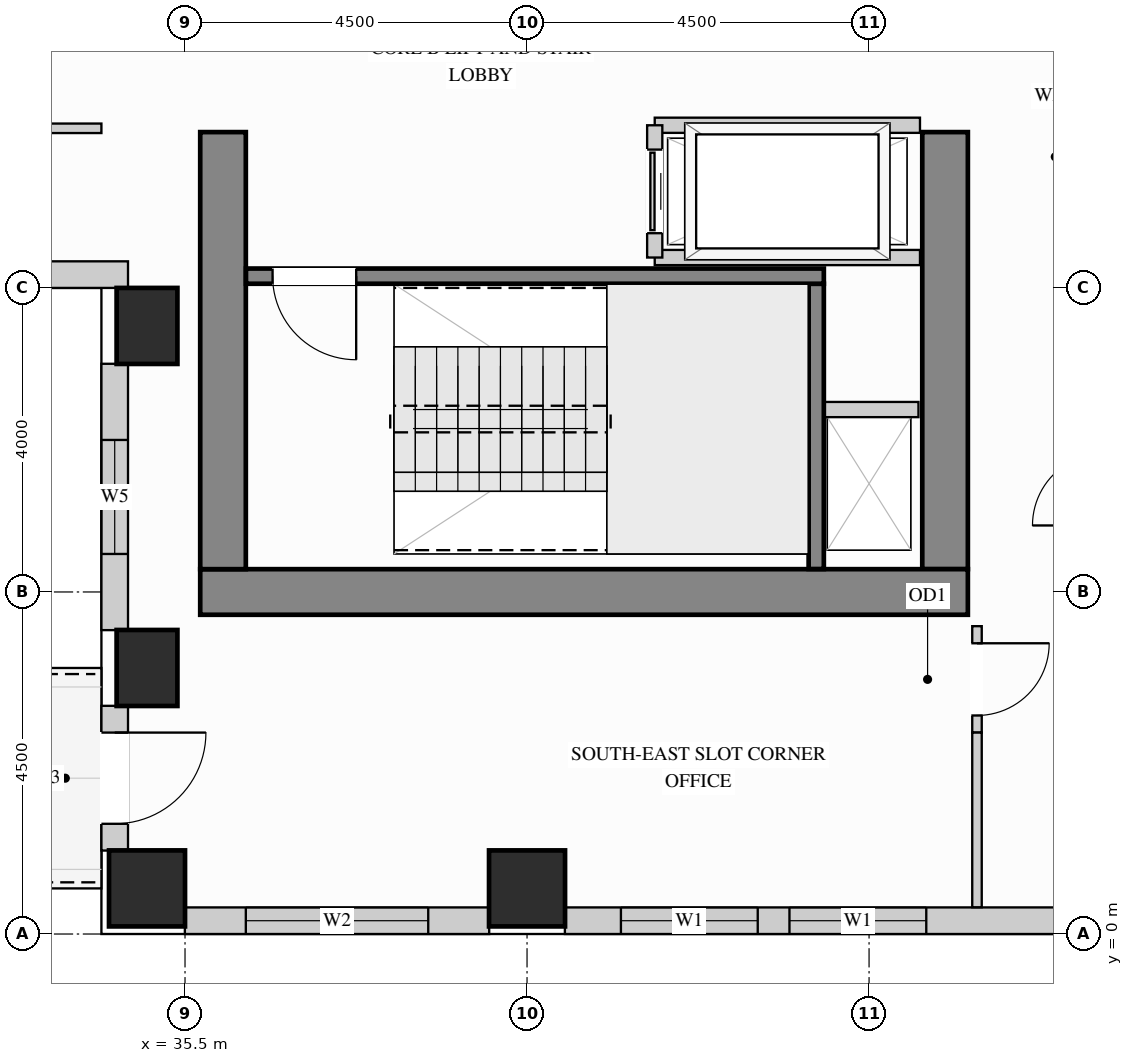
"""IFC4 building model, lengths in metres.
Left out: names, types, materials, properties, quantities, classifications, styles, units other than length and angle.
Written with IfcOpenShell. Run it as: python <this file> out.ifc"""

import sys

from ifc_helpers import new_model, si_unit, direction, frame, frame_2d, origin, origin_2d, place, context, subcontext, project, spatial, rectangle, extrude, source, transform, mapped, element, fill, save


model = new_model("IFC4")
c1 = context("Model", 3, precision=1e-05, world=origin(), true_north=direction((0.0, 1.0)))
c2 = subcontext(c1, "Body", "Model", "MODEL_VIEW")
j1 = project(units=[si_unit("LENGTHUNIT", "METRE"), si_unit("PLANEANGLEUNIT", "RADIAN")], contexts=[c1])
p1 = place(None, origin())
s1 = spatial("IfcSite", under=j1, at=p1, CompositionType="ELEMENT")
p2 = place(p1, origin())
s2 = spatial("IfcBuilding", under=s1, at=p2, CompositionType="ELEMENT")
p3 = place(p2, frame((0.0, 0.0, 164.7)))
s3 = spatial("IfcBuildingStorey", under=s2, at=p3, CompositionType="ELEMENT", Elevation=164.7)
m1 = source(origin(), c2, "Body", "SweptSolid", [
    extrude(rectangle(XDim=0.8, YDim=1.0, at=origin_2d()), origin(), (0.0, 0.0, 1.0), 3.4),
])
for number, where, z_axis, x_axis in (
    (1, (35.0, 3.5, 0.0), (0.0, 0.0, 1.0), (1.0, 0.0, 0.0)),
    (2, (35.0, 8.0, 0.0), (0.0, 0.0, 1.0), (1.0, 0.0, 0.0)),
):
    element("IfcColumn", number, at=place(p3, frame(where, z_axis=z_axis, x_axis=x_axis)), inside=s3, PredefinedType="COLUMN", context=c2, shape_type="MappedRepresentation", body=[
        mapped(m1, transform((0.0, 0.0, 0.0), x_axis=(1.0, 0.0, 0.0), y_axis=(0.0, 1.0, 0.0), z_axis=(0.0, 0.0, 1.0))),
    ])
m2 = source(origin(), c2, "Body", "SweptSolid", [
    extrude(rectangle(XDim=1.0, YDim=1.0, at=origin_2d()), origin(), (0.0, 0.0, 1.0), 3.4),
])
for number, where, z_axis, x_axis in (
    (3, (35.0, 0.6, 0.0), (0.0, 0.0, 1.0), (1.0, 0.0, 0.0)),
    (4, (40.0, 0.6, 0.0), (0.0, 0.0, 1.0), (1.0, 0.0, 0.0)),
):
    element("IfcColumn", number, at=place(p3, frame(where, z_axis=z_axis, x_axis=x_axis)), inside=s3, PredefinedType="COLUMN", context=c2, shape_type="MappedRepresentation", body=[
        mapped(m2, transform((0.0, 0.0, 0.0), x_axis=(1.0, 0.0, 0.0), y_axis=(0.0, 1.0, 0.0), z_axis=(0.0, 0.0, 1.0))),
    ])
m3 = source(origin(), c2, "Body", "SweptSolid", [
    extrude(rectangle(XDim=5.75, YDim=0.6, at=frame_2d((2.875, 0.0))), origin(), (0.0, 0.0, 1.0), 3.4),
])
p4 = place(p3, frame((45.5, 4.8, 0.0), z_axis=(0.0, 0.0, 1.0), x_axis=(0.0, 1.0, 0.0)))
e5 = element("IfcWall", 5, at=p4, inside=s3, PredefinedType="SHEAR", context=c2, shape_type="MappedRepresentation", body=[
    mapped(m3, transform((0.0, 0.0, 0.0), x_axis=(1.0, 0.0, 0.0), y_axis=(0.0, 1.0, 0.0), z_axis=(0.0, 0.0, 1.0))),
])
m4 = source(origin(), c2, "Body", "SweptSolid", [
    extrude(rectangle(XDim=10.1, YDim=0.6, at=frame_2d((5.05, 0.0))), origin(), (0.0, 0.0, 1.0), 3.4),
])
p5 = place(p3, frame((35.7, 4.5, 0.0), z_axis=(0.0, 0.0, 1.0), x_axis=(1.0, 0.0, 0.0)))
e6 = element("IfcWall", 6, at=p5, inside=s3, PredefinedType="SHEAR", context=c2, shape_type="MappedRepresentation", body=[
    mapped(m4, transform((0.0, 0.0, 0.0), x_axis=(1.0, 0.0, 0.0), y_axis=(0.0, 1.0, 0.0), z_axis=(0.0, 0.0, 1.0))),
])
p6 = place(p3, frame((36.0, 4.8, 0.0), z_axis=(0.0, 0.0, 1.0), x_axis=(0.0, 1.0, 0.0)))
e7 = element("IfcWall", 7, at=p6, inside=s3, PredefinedType="SHEAR", context=c2, shape_type="MappedRepresentation", body=[
    mapped(m3, transform((0.0, 0.0, 0.0), x_axis=(1.0, 0.0, 0.0), y_axis=(0.0, 1.0, 0.0), z_axis=(0.0, 0.0, 1.0))),
])
p7 = place(p3, frame((30.898, 8.675, 0.0), z_axis=(0.0, 0.0, 1.0), x_axis=(1.0, 0.0, 0.0)))
e8 = element("IfcWall", 8, at=p7, inside=s3, PredefinedType="SOLIDWALL", context=c2, shape_type="SweptSolid", body=[
    extrude(rectangle(XDim=3.852, YDim=0.35, at=frame_2d((1.926, 0.0))), origin(), (0.0, 0.0, 1.0), 3.385),
])
p8 = place(p7, frame((1.176, 0.0, 0.78)))
e9 = element("IfcOpeningElement", 9, at=p8, cuts=e8, PredefinedType="OPENING", context=c2, shape_type="SweptSolid", body=[
    extrude(rectangle(XDim=1.5, YDim=2.0, at=frame_2d((0.75, 1.0))), frame((0.0, 0.185, 0.0), z_axis=(0.0, -1.0, 0.0), x_axis=(1.0, 0.0, 0.0)), (0.0, 0.0, 1.0), 0.37),
])
p9 = place(p3, frame((34.575, 7.502, 0.0), z_axis=(0.0, 0.0, 1.0), x_axis=(0.0, -1.0, 0.0)))
e10 = element("IfcWall", 10, at=p9, inside=s3, PredefinedType="SOLIDWALL", context=c2, shape_type="SweptSolid", body=[
    extrude(rectangle(XDim=3.504, YDim=0.35, at=frame_2d((1.752, 0.0))), origin(), (0.0, 0.0, 1.0), 2.612),
])
p10 = place(p9, frame((1.002, 0.0, 0.78)))
e11 = element("IfcOpeningElement", 11, at=p10, cuts=e10, PredefinedType="OPENING", context=c2, shape_type="SweptSolid", body=[
    extrude(rectangle(XDim=1.5, YDim=1.652, at=frame_2d((0.75, 0.826))), frame((0.0, 0.185, 0.0), z_axis=(0.0, -1.0, 0.0), x_axis=(1.0, 0.0, 0.0)), (0.0, 0.0, 1.0), 0.37),
])
p11 = place(p3, frame((34.575, 3.002, 0.0), z_axis=(0.0, 0.0, 1.0), x_axis=(0.0, -1.0, 0.0)))
e12 = element("IfcWall", 12, at=p11, inside=s3, PredefinedType="SOLIDWALL", context=c2, shape_type="SweptSolid", body=[
    extrude(rectangle(XDim=1.904, YDim=0.35, at=frame_2d((0.952, 0.0))), origin(), (0.0, 0.0, 1.0), 2.612),
])
p12 = place(p11, frame((0.352, 0.0, 0.0)))
e13 = element("IfcOpeningElement", 13, at=p12, cuts=e12, PredefinedType="OPENING", context=c2, shape_type="SweptSolid", body=[
    extrude(rectangle(XDim=1.2, YDim=2.15, at=frame_2d((0.6, 1.075))), frame((0.0, 0.185, 0.0), z_axis=(0.0, -1.0, 0.0), x_axis=(1.0, 0.0, 0.0)), (0.0, 0.0, 1.0), 0.37),
])
p13 = place(p3, frame((35.498, 0.175, 0.0), z_axis=(0.0, 0.0, 1.0), x_axis=(1.0, 0.0, 0.0)))
e14 = element("IfcWall", 14, at=p13, inside=s3, PredefinedType="SOLIDWALL", context=c2, shape_type="SweptSolid", body=[
    extrude(rectangle(XDim=4.004, YDim=0.35, at=frame_2d((2.002, 0.0))), origin(), (0.0, 0.0, 1.0), 2.612),
])
p14 = place(p13, frame((0.802, 0.0, 0.78)))
e15 = element("IfcOpeningElement", 15, at=p14, cuts=e14, PredefinedType="OPENING", context=c2, shape_type="SweptSolid", body=[
    extrude(rectangle(XDim=2.4, YDim=1.652, at=frame_2d((1.2, 0.826))), frame((0.0, 0.185, 0.0), z_axis=(0.0, -1.0, 0.0), x_axis=(1.0, 0.0, 0.0)), (0.0, 0.0, 1.0), 0.37),
])
p15 = place(p3, frame((40.498, 0.175, 0.0), z_axis=(0.0, 0.0, 1.0), x_axis=(1.0, 0.0, 0.0)))
e16 = element("IfcWall", 16, at=p15, inside=s3, PredefinedType="SOLIDWALL", context=c2, shape_type="SweptSolid", body=[
    extrude(rectangle(XDim=6.604, YDim=0.35, at=frame_2d((3.302, 0.0))), origin(), (0.0, 0.0, 1.0), 2.612),
])
p16 = place(p15, frame((0.737, 0.0, 0.78)))
e17 = element("IfcOpeningElement", 17, at=p16, cuts=e16, PredefinedType="OPENING", context=c2, shape_type="SweptSolid", body=[
    extrude(rectangle(XDim=1.8, YDim=1.652, at=frame_2d((0.9, 0.826))), frame((0.0, 0.185, 0.0), z_axis=(0.0, -1.0, 0.0), x_axis=(1.0, 0.0, 0.0)), (0.0, 0.0, 1.0), 0.37),
])
p17 = place(p15, frame((2.955, 0.0, 0.78)))
e18 = element("IfcOpeningElement", 18, at=p17, cuts=e16, PredefinedType="OPENING", context=c2, shape_type="SweptSolid", body=[
    extrude(rectangle(XDim=1.8, YDim=1.652, at=frame_2d((0.9, 0.826))), frame((0.0, 0.185, 0.0), z_axis=(0.0, -1.0, 0.0), x_axis=(1.0, 0.0, 0.0)), (0.0, 0.0, 1.0), 0.37),
])
p18 = place(p3, frame((45.92, 2.65, 0.0), z_axis=(0.0, 0.0, 1.0), x_axis=(0.0, 1.0, 0.0)))
e19 = element("IfcWall", 19, at=p18, inside=s3, PredefinedType="PARTITIONING", context=c2, shape_type="SweptSolid", body=[
    extrude(rectangle(XDim=1.4, YDim=0.125, at=frame_2d((0.7, 0.0))), origin(), (0.0, 0.0, 1.0), 3.385),
])
p19 = place(p18, frame((0.225, 0.0, 0.0)))
e20 = element("IfcOpeningElement", 20, at=p19, cuts=e19, PredefinedType="OPENING", context=c2, shape_type="SweptSolid", body=[
    extrude(rectangle(XDim=0.95, YDim=2.15, at=frame_2d((0.475, 1.075))), frame((0.0, 0.073, 0.0), z_axis=(0.0, -1.0, 0.0), x_axis=(1.0, 0.0, 0.0)), (0.0, 0.0, 1.0), 0.145),
])
m5 = source(origin(), c2, "Body", "SweptSolid", [
    extrude(rectangle(XDim=2.298, YDim=0.125, at=frame_2d((1.149, 0.0))), origin(), (0.0, 0.0, 1.0), 3.385),
])
p20 = place(p3, frame((45.92, 0.352, 0.0), z_axis=(0.0, 0.0, 1.0), x_axis=(0.0, 1.0, 0.0)))
e21 = element("IfcWall", 21, at=p20, inside=s3, PredefinedType="PARTITIONING", context=c2, shape_type="MappedRepresentation", body=[
    mapped(m5, transform((0.0, 0.0, 0.0), x_axis=(1.0, 0.0, 0.0), y_axis=(0.0, 1.0, 0.0), z_axis=(0.0, 0.0, 1.0))),
])
p21 = place(p3, frame((19.5, 10.6, 0.0), z_axis=(0.0, 0.0, 1.0), x_axis=(1.0, 0.0, 0.0)))
e22 = element("IfcWall", 22, at=p21, inside=s3, PredefinedType="PARTITIONING", context=c2, shape_type="SweptSolid", body=[
    extrude(rectangle(XDim=14.9, YDim=0.125, at=frame_2d((7.45, 0.0))), origin(), (0.0, 0.0, 1.0), 3.385),
])
p22 = place(p21, frame((6.975, 0.0, 0.0)))
e23 = element("IfcOpeningElement", 23, at=p22, cuts=e22, PredefinedType="OPENING", context=c2, shape_type="SweptSolid", body=[
    extrude(rectangle(XDim=0.95, YDim=2.15, at=frame_2d((0.475, 1.075))), frame((0.0, 0.073, 0.0), z_axis=(0.0, -1.0, 0.0), x_axis=(1.0, 0.0, 0.0)), (0.0, 0.0, 1.0), 0.145),
])
m6 = source(origin(), c2, "Body", "SweptSolid", [
    extrude(rectangle(XDim=1.3, YDim=0.2, at=frame_2d((0.65, 0.0))), origin(), (0.0, 0.0, 1.0), 3.385),
])
p23 = place(p3, frame((43.85, 6.9, 0.0), z_axis=(0.0, 0.0, 1.0), x_axis=(1.0, 0.0, 0.0)))
e24 = element("IfcWall", 24, at=p23, inside=s3, PredefinedType="PARTITIONING", context=c2, shape_type="MappedRepresentation", body=[
    mapped(m6, transform((0.0, 0.0, 0.0), x_axis=(1.0, 0.0, 0.0), y_axis=(0.0, 1.0, 0.0), z_axis=(0.0, 0.0, 1.0))),
])
m7 = source(origin(), c2, "Body", "SweptSolid", [
    extrude(rectangle(XDim=3.49, YDim=0.2, at=frame_2d((1.745, 0.0))), origin(), (0.0, 0.0, 1.0), 3.385),
])
for number, where, z_axis, x_axis in (
    (25, (41.68, 10.64, 0.0), (0.0, 0.0, 1.0), (1.0, 0.0, 0.0)),
    (26, (41.68, 8.9, 0.0), (0.0, 0.0, 1.0), (1.0, 0.0, 0.0)),
):
    element("IfcWall", number, at=place(p3, frame(where, z_axis=z_axis, x_axis=x_axis)), inside=s3, PredefinedType="PARTITIONING", context=c2, shape_type="MappedRepresentation", body=[
        mapped(m7, transform((0.0, 0.0, 0.0), x_axis=(1.0, 0.0, 0.0), y_axis=(0.0, 1.0, 0.0), z_axis=(0.0, 0.0, 1.0))),
    ])
p24 = place(p3, frame((41.68, 8.9, 0.0), z_axis=(0.0, 0.0, 1.0), x_axis=(0.0, 1.0, 0.0)))
e27 = element("IfcWall", 27, at=p24, inside=s3, PredefinedType="PARTITIONING", context=c2, shape_type="SweptSolid", body=[
    extrude(rectangle(XDim=1.74, YDim=0.2, at=frame_2d((0.87, 0.0))), origin(), (0.0, 0.0, 1.0), 3.385),
])
p25 = place(p24, frame((0.32, 0.0, 0.0)))
e28 = element("IfcOpeningElement", 28, at=p25, cuts=e27, PredefinedType="OPENING", context=c2, shape_type="SweptSolid", body=[
    extrude(rectangle(XDim=1.1, YDim=2.2, at=frame_2d((0.55, 1.1))), frame((0.0, 0.11, 0.0), z_axis=(0.0, -1.0, 0.0), x_axis=(1.0, 0.0, 0.0)), (0.0, 0.0, 1.0), 0.22),
])
m8 = source(origin(), c2, "Body", "SweptSolid", [
    extrude(rectangle(XDim=3.753, YDim=0.2, at=frame_2d((1.876, 0.0))), origin(), (0.0, 0.0, 1.0), 3.4),
])
p26 = place(p3, frame((43.805, 4.802, 0.0), z_axis=(0.0, 0.0, 1.0), x_axis=(0.0, 1.0, 0.0)))
e29 = element("IfcWall", 29, at=p26, inside=s3, PredefinedType="SHEAR", context=c2, shape_type="MappedRepresentation", body=[
    mapped(m8, transform((0.0, 0.0, 0.0), x_axis=(1.0, 0.0, 0.0), y_axis=(0.0, 1.0, 0.0), z_axis=(0.0, 0.0, 1.0))),
])
p27 = place(p3, frame((36.302, 8.655, 0.0), z_axis=(0.0, 0.0, 1.0), x_axis=(1.0, 0.0, 0.0)))
e30 = element("IfcWall", 30, at=p27, inside=s3, PredefinedType="SHEAR", context=c2, shape_type="SweptSolid", body=[
    extrude(rectangle(XDim=7.603, YDim=0.2, at=frame_2d((3.802, 0.0))), origin(), (0.0, 0.0, 1.0), 3.4),
])
p28 = place(p27, frame((0.35, 0.0, 0.0)))
e31 = element("IfcOpeningElement", 31, at=p28, cuts=e30, PredefinedType="OPENING", context=c2, shape_type="SweptSolid", body=[
    extrude(rectangle(XDim=1.1, YDim=2.15, at=frame_2d((0.55, 1.075))), frame((0.0, 0.11, 0.0), z_axis=(0.0, -1.0, 0.0), x_axis=(1.0, 0.0, 0.0)), (0.0, 0.0, 1.0), 0.22),
])
m9 = source(origin(), c2, "Body", "SweptSolid", [
    extrude(rectangle(XDim=1.2, YDim=2.15, at=frame_2d((0.6, 1.075))), frame((0.0, 0.025, 0.0), z_axis=(0.0, -1.0, 0.0), x_axis=(1.0, 0.0, 0.0)), (0.0, 0.0, 1.0), 0.05),
])
p29 = place(p12, frame((1.2, 0.0, 0.0), z_axis=(0.0, 0.0, 1.0), x_axis=(-1.0, 0.0, 0.0)))
e32 = element("IfcDoor", 32, at=p29, inside=s3, OperationType="SINGLE_SWING_LEFT", PredefinedType="DOOR", context=c2, shape_type="MappedRepresentation", body=[
    mapped(m9, transform((0.0, 0.0, 0.0), x_axis=(1.0, 0.0, 0.0), y_axis=(0.0, 1.0, 0.0), z_axis=(0.0, 0.0, 1.0))),
])
fill(e13, e32)
m10 = source(origin(), c2, "Body", "SweptSolid", [
    extrude(rectangle(XDim=1.1, YDim=2.2, at=frame_2d((0.55, 1.1))), frame((0.0, 0.025, 0.0), z_axis=(0.0, -1.0, 0.0), x_axis=(1.0, 0.0, 0.0)), (0.0, 0.0, 1.0), 0.05),
])
p30 = place(p25, origin())
e33 = element("IfcDoor", 33, at=p30, inside=s3, OperationType="SLIDING_TO_LEFT", PredefinedType="DOOR", context=c2, shape_type="MappedRepresentation", body=[
    mapped(m10, transform((0.0, 0.0, 0.0), x_axis=(1.0, 0.0, 0.0), y_axis=(0.0, 1.0, 0.0), z_axis=(0.0, 0.0, 1.0))),
])
fill(e28, e33)
m11 = source(origin(), c2, "Body", "SweptSolid", [
    extrude(rectangle(XDim=0.95, YDim=2.15, at=frame_2d((0.475, 1.075))), frame((0.0, 0.025, 0.0), z_axis=(0.0, -1.0, 0.0), x_axis=(1.0, 0.0, 0.0)), (0.0, 0.0, 1.0), 0.05),
])
p31 = place(p19, origin())
e34 = element("IfcDoor", 34, at=p31, inside=s3, OperationType="SINGLE_SWING_RIGHT", PredefinedType="DOOR", context=c2, shape_type="MappedRepresentation", body=[
    mapped(m11, transform((0.0, 0.0, 0.0), x_axis=(1.0, 0.0, 0.0), y_axis=(0.0, 1.0, 0.0), z_axis=(0.0, 0.0, 1.0))),
])
fill(e20, e34)
m12 = source(origin(), c2, "Body", "SweptSolid", [
    extrude(rectangle(XDim=1.1, YDim=2.15, at=frame_2d((0.55, 1.075))), frame((0.0, 0.025, 0.0), z_axis=(0.0, -1.0, 0.0), x_axis=(1.0, 0.0, 0.0)), (0.0, 0.0, 1.0), 0.05),
])
p32 = place(p28, origin())
e35 = element("IfcDoor", 35, at=p32, inside=s3, OperationType="SINGLE_SWING_RIGHT", PredefinedType="DOOR", context=c2, shape_type="MappedRepresentation", body=[
    mapped(m12, transform((0.0, 0.0, 0.0), x_axis=(1.0, 0.0, 0.0), y_axis=(0.0, 1.0, 0.0), z_axis=(0.0, 0.0, 1.0))),
])
fill(e31, e35)
m13 = source(origin(), c2, "Body", "SweptSolid", [
    extrude(rectangle(XDim=1.8, YDim=1.652, at=frame_2d((0.9, 0.826))), frame((0.0, 0.03, 0.0), z_axis=(0.0, -1.0, 0.0), x_axis=(1.0, 0.0, 0.0)), (0.0, 0.0, 1.0), 0.06),
])
p33 = place(p16, origin())
e36 = element("IfcWindow", 36, at=p33, inside=s3, PartitioningType="SINGLE_PANEL", PredefinedType="WINDOW", context=c2, shape_type="MappedRepresentation", body=[
    mapped(m13, transform((0.0, 0.0, 0.0), x_axis=(1.0, 0.0, 0.0), y_axis=(0.0, 1.0, 0.0), z_axis=(0.0, 0.0, 1.0))),
])
fill(e17, e36)
p34 = place(p17, origin())
e37 = element("IfcWindow", 37, at=p34, inside=s3, PartitioningType="SINGLE_PANEL", PredefinedType="WINDOW", context=c2, shape_type="MappedRepresentation", body=[
    mapped(m13, transform((0.0, 0.0, 0.0), x_axis=(1.0, 0.0, 0.0), y_axis=(0.0, 1.0, 0.0), z_axis=(0.0, 0.0, 1.0))),
])
fill(e18, e37)
m14 = source(origin(), c2, "Body", "SweptSolid", [
    extrude(rectangle(XDim=2.4, YDim=1.652, at=frame_2d((1.2, 0.826))), frame((0.0, 0.03, 0.0), z_axis=(0.0, -1.0, 0.0), x_axis=(1.0, 0.0, 0.0)), (0.0, 0.0, 1.0), 0.06),
])
p35 = place(p14, origin())
e38 = element("IfcWindow", 38, at=p35, inside=s3, PartitioningType="SINGLE_PANEL", PredefinedType="WINDOW", context=c2, shape_type="MappedRepresentation", body=[
    mapped(m14, transform((0.0, 0.0, 0.0), x_axis=(1.0, 0.0, 0.0), y_axis=(0.0, 1.0, 0.0), z_axis=(0.0, 0.0, 1.0))),
])
fill(e15, e38)
m15 = source(origin(), c2, "Body", "SweptSolid", [
    extrude(rectangle(XDim=1.5, YDim=1.652, at=frame_2d((0.75, 0.826))), frame((0.0, 0.03, 0.0), z_axis=(0.0, -1.0, 0.0), x_axis=(1.0, 0.0, 0.0)), (0.0, 0.0, 1.0), 0.06),
])
p36 = place(p10, origin())
e39 = element("IfcWindow", 39, at=p36, inside=s3, PartitioningType="SINGLE_PANEL", PredefinedType="WINDOW", context=c2, shape_type="MappedRepresentation", body=[
    mapped(m15, transform((0.0, 0.0, 0.0), x_axis=(1.0, 0.0, 0.0), y_axis=(0.0, 1.0, 0.0), z_axis=(0.0, 0.0, 1.0))),
])
fill(e11, e39)
save(model, sys.argv[1])
